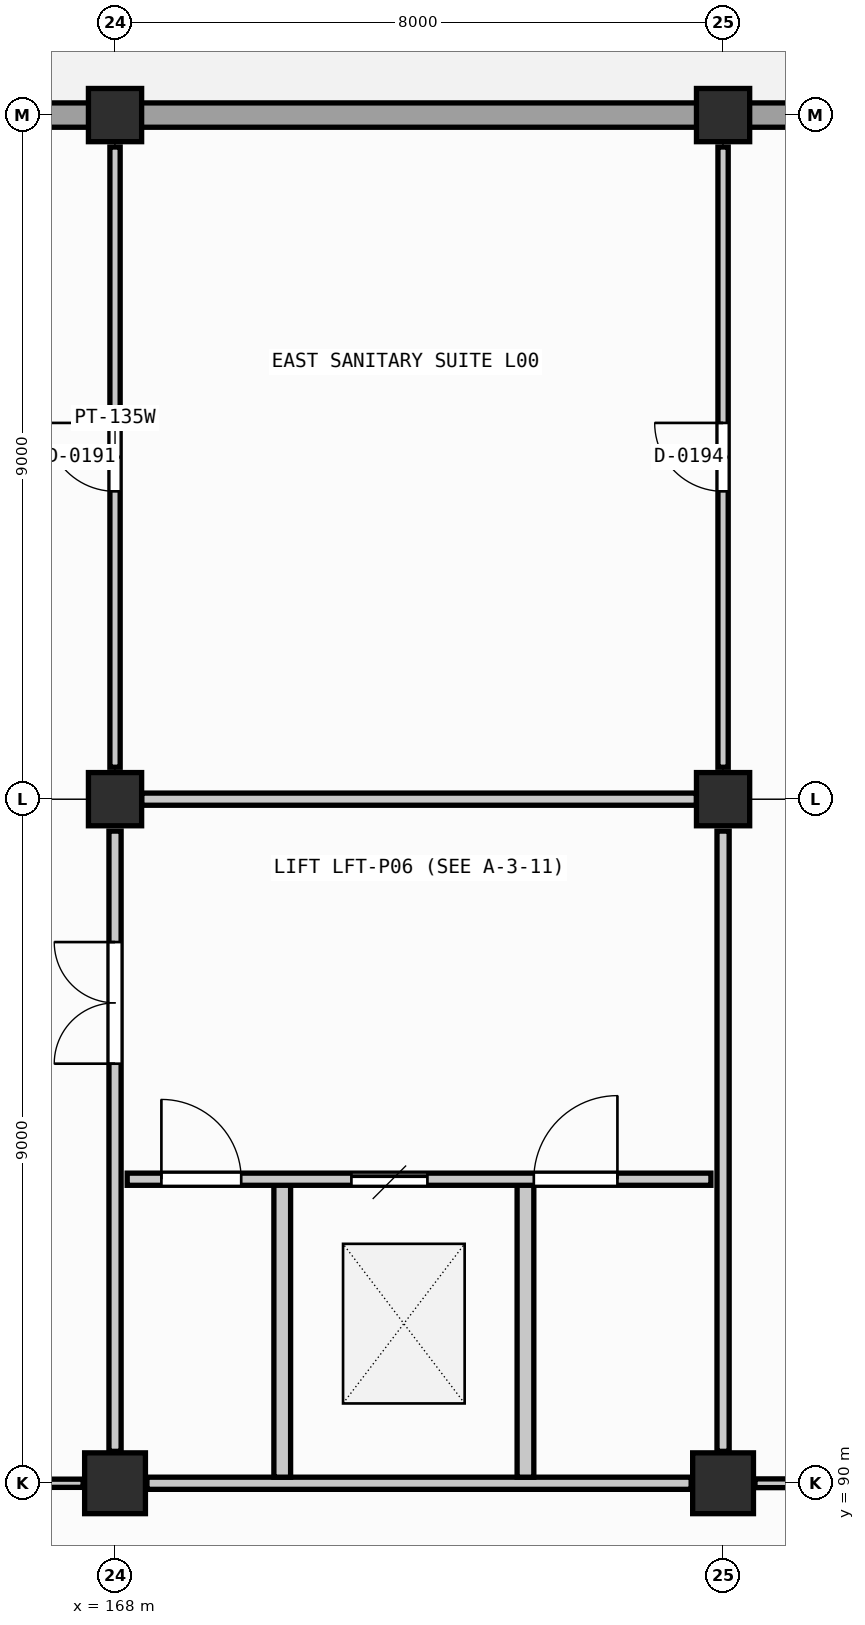
"""IFC4 building model, lengths in metres.
Left out: names, types, materials, properties, quantities, classifications, styles, units other than length and angle.
Written with IfcOpenShell. Run it as: python <this file> out.ifc"""

import sys

from ifc_helpers import new_model, si_unit, direction, frame, frame_2d, origin, origin_2d, place, context, subcontext, project, spatial, rectangle, extrude, element, fill, save


model = new_model("IFC4")
c1 = context("Model", 3, precision=1e-05, world=origin(), true_north=direction((0.0, 1.0)))
c2 = subcontext(c1, "Body", "Model", "MODEL_VIEW")
j1 = project(units=[si_unit("LENGTHUNIT", "METRE"), si_unit("PLANEANGLEUNIT", "RADIAN")], contexts=[c1])
p1 = place(None, origin())
s1 = spatial("IfcSite", under=j1, at=p1, CompositionType="ELEMENT")
p2 = place(p1, origin())
s2 = spatial("IfcBuilding", under=s1, at=p2, CompositionType="ELEMENT")
p3 = place(p2, origin())
s3 = spatial("IfcBuildingStorey", under=s2, at=p3, CompositionType="ELEMENT", Elevation=0.0)
p4 = place(p3, frame((168.0, 90.0, -1.25), z_axis=(0.0, 0.0, 1.0), x_axis=(1.0, 0.0, 0.0)))
e1 = element("IfcColumn", 1, at=p4, inside=s3, PredefinedType="COLUMN", context=c2, shape_type="SweptSolid", body=[
    extrude(rectangle(XDim=0.8, YDim=0.8, at=origin_2d()), origin(), (0.0, 0.0, 1.0), 6.05),
])
for number, where, z_axis, x_axis in (
    (2, (168.0, 99.0, -1.25), (0.0, 0.0, 1.0), (1.0, 0.0, 0.0)),
    (3, (168.0, 108.0, -1.25), (0.0, 0.0, 1.0), (1.0, 0.0, 0.0)),
):
    element("IfcColumn", number, at=place(p3, frame(where, z_axis=z_axis, x_axis=x_axis)), inside=s3, PredefinedType="COLUMN", context=c2, shape_type="SweptSolid", body=[
        extrude(rectangle(XDim=0.7, YDim=0.7, at=origin_2d()), origin(), (0.0, 0.0, 1.0), 6.05),
    ])
p5 = place(p3, frame((176.0, 90.0, -1.25), z_axis=(0.0, 0.0, 1.0), x_axis=(1.0, 0.0, 0.0)))
e4 = element("IfcColumn", 4, at=p5, inside=s3, PredefinedType="COLUMN", context=c2, shape_type="SweptSolid", body=[
    extrude(rectangle(XDim=0.8, YDim=0.8, at=origin_2d()), origin(), (0.0, 0.0, 1.0), 6.05),
])
for number, where, z_axis, x_axis in (
    (5, (176.0, 99.0, -1.25), (0.0, 0.0, 1.0), (1.0, 0.0, 0.0)),
    (6, (176.0, 108.0, -1.25), (0.0, 0.0, 1.0), (1.0, 0.0, 0.0)),
):
    element("IfcColumn", number, at=place(p3, frame(where, z_axis=z_axis, x_axis=x_axis)), inside=s3, PredefinedType="COLUMN", context=c2, shape_type="SweptSolid", body=[
        extrude(rectangle(XDim=0.7, YDim=0.7, at=origin_2d()), origin(), (0.0, 0.0, 1.0), 6.05),
    ])
p6 = place(p3, frame((167.655, 108.0, 0.0), z_axis=(0.0, 0.0, 1.0), x_axis=(-1.0, 0.0, 0.0)))
e7 = element("IfcWall", 7, at=p6, inside=s3, PredefinedType="SOLIDWALL", context=c2, shape_type="SweptSolid", body=[
    extrude(rectangle(XDim=7.31, YDim=0.32, at=frame_2d((3.655, 0.0))), origin(), (0.0, 0.0, 1.0), 3.65),
])
p7 = place(p6, frame((2.555, 0.0, 0.0)))
e8 = element("IfcOpeningElement", 8, at=p7, cuts=e7, PredefinedType="OPENING", context=c2, shape_type="SweptSolid", body=[
    extrude(rectangle(XDim=2.2, YDim=2.3, at=frame_2d((1.1, 1.15))), frame((0.0, 0.17, 0.0), z_axis=(0.0, -1.0, 0.0), x_axis=(1.0, 0.0, 0.0)), (0.0, 0.0, 1.0), 0.34),
])
p8 = place(p3, frame((175.655, 108.0, 0.0), z_axis=(0.0, 0.0, 1.0), x_axis=(-1.0, 0.0, 0.0)))
e9 = element("IfcWall", 9, at=p8, inside=s3, PredefinedType="SOLIDWALL", context=c2, shape_type="SweptSolid", body=[
    extrude(rectangle(XDim=7.31, YDim=0.32, at=frame_2d((3.655, 0.0))), origin(), (0.0, 0.0, 1.0), 3.65),
])
p9 = place(p3, frame((183.655, 108.0, 0.0), z_axis=(0.0, 0.0, 1.0), x_axis=(-1.0, 0.0, 0.0)))
e10 = element("IfcWall", 10, at=p9, inside=s3, PredefinedType="SOLIDWALL", context=c2, shape_type="SweptSolid", body=[
    extrude(rectangle(XDim=7.31, YDim=0.32, at=frame_2d((3.655, 0.0))), origin(), (0.0, 0.0, 1.0), 3.65),
])
p10 = place(p9, frame((2.555, 0.0, 0.0)))
e11 = element("IfcOpeningElement", 11, at=p10, cuts=e10, PredefinedType="OPENING", context=c2, shape_type="SweptSolid", body=[
    extrude(rectangle(XDim=2.2, YDim=2.3, at=frame_2d((1.1, 1.15))), frame((0.0, 0.17, 0.0), z_axis=(0.0, -1.0, 0.0), x_axis=(1.0, 0.0, 0.0)), (0.0, 0.0, 1.0), 0.34),
])
p11 = place(p3, frame((168.0, 90.42, 0.0), z_axis=(0.0, 0.0, 1.0), x_axis=(0.0, 1.0, 0.0)))
e12 = element("IfcWall", 12, at=p11, inside=s3, PredefinedType="PARTITIONING", context=c2, shape_type="SweptSolid", body=[
    extrude(rectangle(XDim=8.16, YDim=0.16, at=frame_2d((4.08, 0.0))), origin(), (0.0, 0.0, 1.0), 3.65),
])
p12 = place(p11, frame((5.1, 0.0, 0.0)))
e13 = element("IfcOpeningElement", 13, at=p12, cuts=e12, PredefinedType="OPENING", context=c2, shape_type="SweptSolid", body=[
    extrude(rectangle(XDim=1.6, YDim=2.2, at=frame_2d((0.8, 1.1))), frame((0.0, 0.09, 0.0), z_axis=(0.0, -1.0, 0.0), x_axis=(1.0, 0.0, 0.0)), (0.0, 0.0, 1.0), 0.18),
])
p13 = place(p3, frame((176.0, 90.42, 0.0), z_axis=(0.0, 0.0, 1.0), x_axis=(0.0, 1.0, 0.0)))
e14 = element("IfcWall", 14, at=p13, inside=s3, PredefinedType="PARTITIONING", context=c2, shape_type="SweptSolid", body=[
    extrude(rectangle(XDim=8.16, YDim=0.16, at=frame_2d((4.08, 0.0))), origin(), (0.0, 0.0, 1.0), 3.65),
])
p14 = place(p3, frame((168.42, 90.0, 0.0), z_axis=(0.0, 0.0, 1.0), x_axis=(1.0, 0.0, 0.0)))
e15 = element("IfcWall", 15, at=p14, inside=s3, PredefinedType="PARTITIONING", context=c2, shape_type="SweptSolid", body=[
    extrude(rectangle(XDim=7.16, YDim=0.16, at=frame_2d((3.58, 0.0))), origin(), (0.0, 0.0, 1.0), 3.65),
])
for number, where, z_axis, x_axis in (
    (16, (170.2, 90.08, 0.0), (0.0, 0.0, 1.0), (0.0, 1.0, 0.0)),
    (17, (173.4, 90.08, 0.0), (0.0, 0.0, 1.0), (0.0, 1.0, 0.0)),
):
    element("IfcWall", number, at=place(p3, frame(where, z_axis=z_axis, x_axis=x_axis)), inside=s3, PredefinedType="SOLIDWALL", context=c2, shape_type="SweptSolid", body=[
        extrude(rectangle(XDim=3.92, YDim=0.22, at=frame_2d((1.96, 0.0))), origin(), (0.0, 0.0, 1.0), 3.65),
    ])
p15 = place(p3, frame((168.16, 94.0, 0.0), z_axis=(0.0, 0.0, 1.0), x_axis=(1.0, 0.0, 0.0)))
e18 = element("IfcWall", 18, at=p15, inside=s3, PredefinedType="PARTITIONING", context=c2, shape_type="SweptSolid", body=[
    extrude(rectangle(XDim=7.68, YDim=0.16, at=frame_2d((3.84, 0.0))), origin(), (0.0, 0.0, 1.0), 3.65),
])
p16 = place(p15, frame((0.45, 0.0, 0.0)))
e19 = element("IfcOpeningElement", 19, at=p16, cuts=e18, PredefinedType="OPENING", context=c2, shape_type="SweptSolid", body=[
    extrude(rectangle(XDim=1.05, YDim=2.1, at=frame_2d((0.525, 1.05))), frame((0.0, 0.09, 0.0), z_axis=(0.0, -1.0, 0.0), x_axis=(1.0, 0.0, 0.0)), (0.0, 0.0, 1.0), 0.18),
])
p17 = place(p15, frame((2.95, 0.0, 0.0)))
e20 = element("IfcOpeningElement", 20, at=p17, cuts=e18, PredefinedType="OPENING", context=c2, shape_type="SweptSolid", body=[
    extrude(rectangle(XDim=1.0, YDim=2.15, at=frame_2d((0.5, 1.075))), frame((0.0, 0.09, 0.0), z_axis=(0.0, -1.0, 0.0), x_axis=(1.0, 0.0, 0.0)), (0.0, 0.0, 1.0), 0.18),
])
p18 = place(p15, frame((5.35, 0.0, 0.0)))
e21 = element("IfcOpeningElement", 21, at=p18, cuts=e18, PredefinedType="OPENING", context=c2, shape_type="SweptSolid", body=[
    extrude(rectangle(XDim=1.1, YDim=2.15, at=frame_2d((0.55, 1.075))), frame((0.0, 0.09, 0.0), z_axis=(0.0, -1.0, 0.0), x_axis=(1.0, 0.0, 0.0)), (0.0, 0.0, 1.0), 0.18),
])
p19 = place(p3, frame((168.35, 99.0, 0.0), z_axis=(0.0, 0.0, 1.0), x_axis=(1.0, 0.0, 0.0)))
e22 = element("IfcWall", 22, at=p19, inside=s3, PredefinedType="PARTITIONING", context=c2, shape_type="SweptSolid", body=[
    extrude(rectangle(XDim=7.3, YDim=0.16, at=frame_2d((3.65, 0.0))), origin(), (0.0, 0.0, 1.0), 3.65),
])
p20 = place(p3, frame((160.42, 90.0, 0.0), z_axis=(0.0, 0.0, 1.0), x_axis=(1.0, 0.0, 0.0)))
e23 = element("IfcWall", 23, at=p20, inside=s3, PredefinedType="PARTITIONING", context=c2, shape_type="SweptSolid", body=[
    extrude(rectangle(XDim=7.16, YDim=0.108, at=frame_2d((3.58, 0.0))), origin(), (0.0, 0.0, 1.0), 3.65),
])
p21 = place(p20, frame((2.505, 0.0, 0.0)))
e24 = element("IfcOpeningElement", 24, at=p21, cuts=e23, PredefinedType="OPENING", context=c2, shape_type="SweptSolid", body=[
    extrude(rectangle(XDim=2.15, YDim=2.35, at=frame_2d((1.075, 1.175))), frame((0.0, 0.064, 0.0), z_axis=(0.0, -1.0, 0.0), x_axis=(1.0, 0.0, 0.0)), (0.0, 0.0, 1.0), 0.128),
])
p22 = place(p3, frame((176.42, 90.0, 0.0), z_axis=(0.0, 0.0, 1.0), x_axis=(1.0, 0.0, 0.0)))
e25 = element("IfcWall", 25, at=p22, inside=s3, PredefinedType="PARTITIONING", context=c2, shape_type="SweptSolid", body=[
    extrude(rectangle(XDim=7.16, YDim=0.115, at=frame_2d((3.58, 0.0))), origin(), (0.0, 0.0, 1.0), 3.65),
])
p23 = place(p22, frame((2.605, 0.0, 0.0)))
e26 = element("IfcOpeningElement", 26, at=p23, cuts=e25, PredefinedType="OPENING", context=c2, shape_type="SweptSolid", body=[
    extrude(rectangle(XDim=1.95, YDim=2.3, at=frame_2d((0.975, 1.15))), frame((0.0, 0.067, 0.0), z_axis=(0.0, -1.0, 0.0), x_axis=(1.0, 0.0, 0.0)), (0.0, 0.0, 1.0), 0.135),
])
p24 = place(p3, frame((168.0, 99.42, 0.0), z_axis=(0.0, 0.0, 1.0), x_axis=(0.0, 1.0, 0.0)))
e27 = element("IfcWall", 27, at=p24, inside=s3, PredefinedType="PLUMBINGWALL", context=c2, shape_type="SweptSolid", body=[
    extrude(rectangle(XDim=8.16, YDim=0.135, at=frame_2d((4.08, 0.0))), origin(), (0.0, 0.0, 1.0), 3.65),
])
p25 = place(p24, frame((3.63, 0.0, 0.0)))
e28 = element("IfcOpeningElement", 28, at=p25, cuts=e27, PredefinedType="OPENING", context=c2, shape_type="SweptSolid", body=[
    extrude(rectangle(XDim=0.9, YDim=2.06, at=frame_2d((0.45, 1.03))), frame((0.0, 0.078, 0.0), z_axis=(0.0, -1.0, 0.0), x_axis=(1.0, 0.0, 0.0)), (0.0, 0.0, 1.0), 0.155),
])
p26 = place(p3, frame((176.0, 99.42, 0.0), z_axis=(0.0, 0.0, 1.0), x_axis=(0.0, 1.0, 0.0)))
e29 = element("IfcWall", 29, at=p26, inside=s3, PredefinedType="PLUMBINGWALL", context=c2, shape_type="SweptSolid", body=[
    extrude(rectangle(XDim=8.16, YDim=0.135, at=frame_2d((4.08, 0.0))), origin(), (0.0, 0.0, 1.0), 3.65),
])
p27 = place(p26, frame((3.63, 0.0, 0.0)))
e30 = element("IfcOpeningElement", 30, at=p27, cuts=e29, PredefinedType="OPENING", context=c2, shape_type="SweptSolid", body=[
    extrude(rectangle(XDim=0.9, YDim=2.06, at=frame_2d((0.45, 1.03))), frame((0.0, 0.078, 0.0), z_axis=(0.0, -1.0, 0.0), x_axis=(1.0, 0.0, 0.0)), (0.0, 0.0, 1.0), 0.155),
])
p28 = place(p16, origin())
e31 = element("IfcDoor", 31, at=p28, inside=s3, OperationType="SINGLE_SWING_LEFT", PredefinedType="DOOR", context=c2, shape_type="SweptSolid", body=[
    extrude(rectangle(XDim=1.05, YDim=2.1, at=frame_2d((0.525, 1.05))), frame((0.0, 0.025, 0.0), z_axis=(0.0, -1.0, 0.0), x_axis=(1.0, 0.0, 0.0)), (0.0, 0.0, 1.0), 0.05),
])
fill(e19, e31)
p29 = place(p17, origin())
e32 = element("IfcDoor", 32, at=p29, inside=s3, OperationType="SLIDING_TO_LEFT", PredefinedType="DOOR", context=c2, shape_type="SweptSolid", body=[
    extrude(rectangle(XDim=1.0, YDim=2.15, at=frame_2d((0.5, 1.075))), frame((0.0, 0.025, 0.0), z_axis=(0.0, -1.0, 0.0), x_axis=(1.0, 0.0, 0.0)), (0.0, 0.0, 1.0), 0.05),
])
fill(e20, e32)
p30 = place(p18, origin())
e33 = element("IfcDoor", 33, at=p30, inside=s3, OperationType="SINGLE_SWING_RIGHT", PredefinedType="DOOR", context=c2, shape_type="SweptSolid", body=[
    extrude(rectangle(XDim=1.1, YDim=2.15, at=frame_2d((0.55, 1.075))), frame((0.0, 0.025, 0.0), z_axis=(0.0, -1.0, 0.0), x_axis=(1.0, 0.0, 0.0)), (0.0, 0.0, 1.0), 0.05),
])
fill(e21, e33)
p31 = place(p12, origin())
e34 = element("IfcDoor", 34, at=p31, inside=s3, OperationType="DOUBLE_DOOR_SINGLE_SWING", PredefinedType="DOOR", context=c2, shape_type="SweptSolid", body=[
    extrude(rectangle(XDim=1.6, YDim=2.2, at=frame_2d((0.8, 1.1))), frame((0.0, 0.025, 0.0), z_axis=(0.0, -1.0, 0.0), x_axis=(1.0, 0.0, 0.0)), (0.0, 0.0, 1.0), 0.05),
])
fill(e13, e34)
p32 = place(p25, origin())
e35 = element("IfcDoor", 35, at=p32, inside=s3, OperationType="SINGLE_SWING_RIGHT", PredefinedType="DOOR", context=c2, shape_type="SweptSolid", body=[
    extrude(rectangle(XDim=0.9, YDim=2.06, at=frame_2d((0.45, 1.03))), frame((0.0, 0.025, 0.0), z_axis=(0.0, -1.0, 0.0), x_axis=(1.0, 0.0, 0.0)), (0.0, 0.0, 1.0), 0.05),
])
fill(e28, e35)
p33 = place(p27, origin())
e36 = element("IfcDoor", 36, at=p33, inside=s3, OperationType="SINGLE_SWING_RIGHT", PredefinedType="DOOR", context=c2, shape_type="SweptSolid", body=[
    extrude(rectangle(XDim=0.9, YDim=2.06, at=frame_2d((0.45, 1.03))), frame((0.0, 0.025, 0.0), z_axis=(0.0, -1.0, 0.0), x_axis=(1.0, 0.0, 0.0)), (0.0, 0.0, 1.0), 0.05),
])
fill(e30, e36)
save(model, sys.argv[1])
